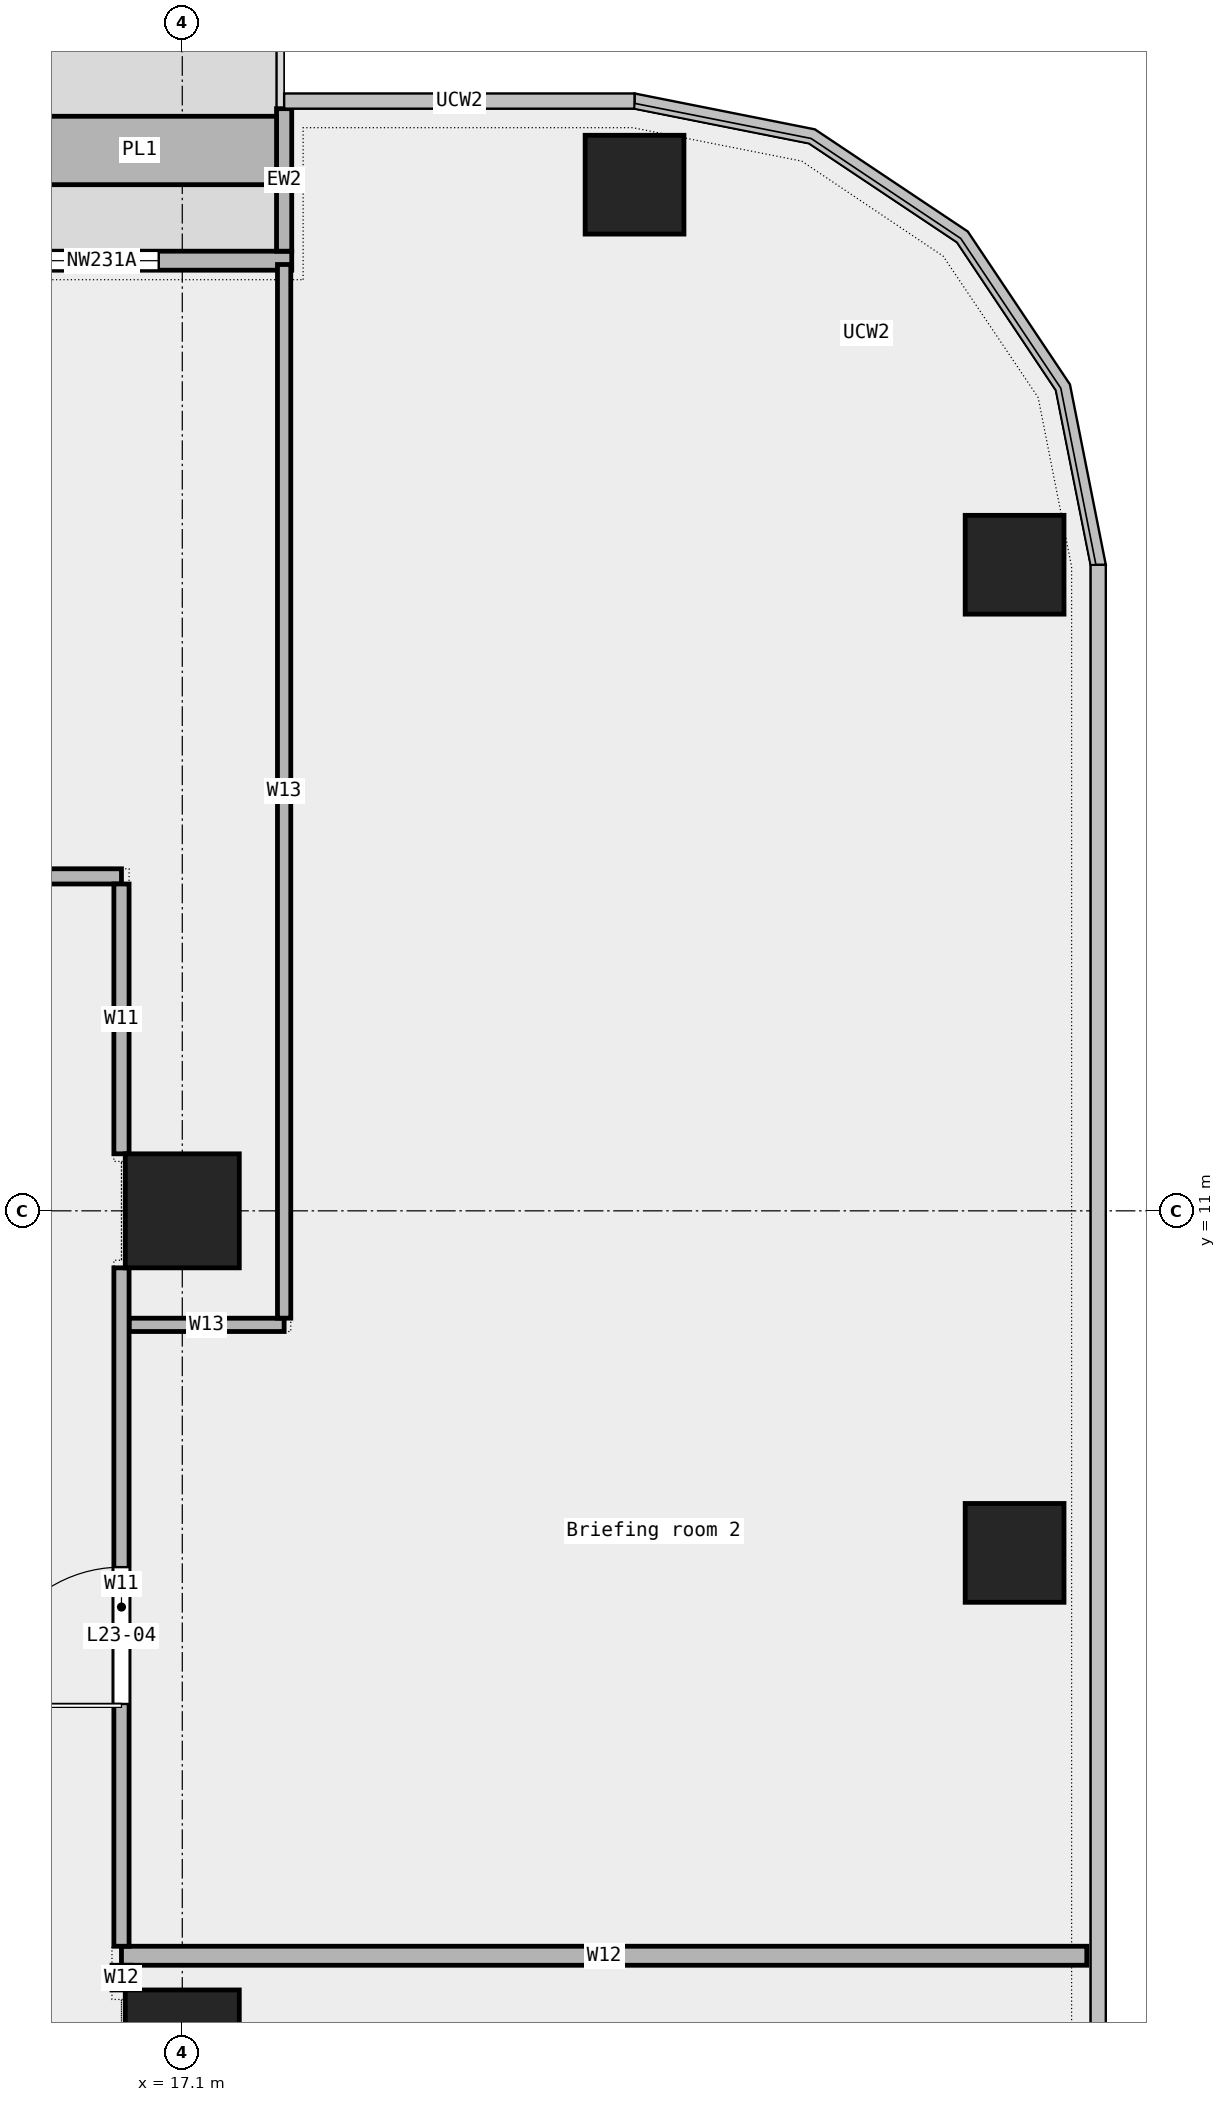
"""IFC4 building model, lengths in metres.
Left out: names, types, materials, properties, quantities, classifications, styles, units other than length and angle.
Written with IfcOpenShell. Run it as: python <this file> out.ifc"""

import sys

from ifc_helpers import new_model, si_unit, direction, frame, frame_2d, origin, origin_2d, place, context, subcontext, project, spatial, rectangle, extrude, element, fill, save


model = new_model("IFC4")
c1 = context("Model", 3, precision=1e-05, world=origin(), true_north=direction((0.0, 1.0)))
c2 = subcontext(c1, "Body", "Model", "MODEL_VIEW")
j1 = project(units=[si_unit("LENGTHUNIT", "METRE"), si_unit("PLANEANGLEUNIT", "RADIAN")], contexts=[c1])
p1 = place(None, origin())
s1 = spatial("IfcSite", under=j1, at=p1, CompositionType="ELEMENT")
p2 = place(p1, origin())
s2 = spatial("IfcBuilding", under=s1, at=p2, CompositionType="ELEMENT")
p3 = place(p2, frame((0.0, 0.0, 117.1)))
s3 = spatial("IfcBuildingStorey", under=s2, at=p3, CompositionType="ELEMENT", Elevation=117.1)
for number, where, z_axis, x_axis in (
    (1, (28.05, 6.5, 0.0), (0.0, 0.0, 1.0), (1.0, 0.0, 0.0)),
    (2, (28.05, 19.5, 0.0), (0.0, 0.0, 1.0), (1.0, 0.0, 0.0)),
    (3, (23.05, 24.5, 0.0), (0.0, 0.0, 1.0), (1.0, 0.0, 0.0)),
):
    element("IfcColumn", number, at=place(p3, frame(where, z_axis=z_axis, x_axis=x_axis)), inside=s3, PredefinedType="COLUMN", context=c2, shape_type="SweptSolid", body=[
        extrude(rectangle(XDim=1.3, YDim=1.3, at=origin_2d()), origin(), (0.0, 0.0, 1.0), 4.05),
    ])
for number, where, z_axis, x_axis in (
    (4, (17.1, 0.0, 0.0), (0.0, 0.0, 1.0), (1.0, 0.0, 0.0)),
    (5, (17.1, 11.0, 0.0), (0.0, 0.0, 1.0), (1.0, 0.0, 0.0)),
):
    element("IfcColumn", number, at=place(p3, frame(where, z_axis=z_axis, x_axis=x_axis)), inside=s3, PredefinedType="COLUMN", context=c2, shape_type="SweptSolid", body=[
        extrude(rectangle(XDim=1.5, YDim=1.5, at=origin_2d()), origin(), (0.0, 0.0, 1.0), 4.05),
    ])
p4 = place(p3, frame((18.54, 23.5, 0.0), z_axis=(0.0, 0.0, 1.0), x_axis=(-1.0, 0.0, 0.0)))
e6 = element("IfcWall", 6, at=p4, inside=s3, PredefinedType="STANDARD", context=c2, shape_type="SweptSolid", body=[
    extrude(rectangle(XDim=14.03, YDim=0.25, at=frame_2d((7.015, 0.0))), origin(), (0.0, 0.0, 1.0), 4.05),
])
p5 = place(p4, frame((1.75, 0.0, 0.45)))
e7 = element("IfcOpeningElement", 7, at=p5, cuts=e6, PredefinedType="OPENING", context=c2, shape_type="SweptSolid", body=[
    extrude(rectangle(XDim=1.5, YDim=3.0, at=frame_2d((0.75, 1.5))), frame((0.0, 0.137, 0.0), z_axis=(0.0, -1.0, 0.0), x_axis=(1.0, 0.0, 0.0)), (0.0, 0.0, 1.0), 0.274),
])
p6 = place(p4, frame((4.25, 0.0, 0.0)))
e8 = element("IfcOpeningElement", 8, at=p6, cuts=e6, PredefinedType="OPENING", context=c2, shape_type="SweptSolid", body=[
    extrude(rectangle(XDim=1.8, YDim=2.4, at=frame_2d((0.9, 1.2))), frame((0.0, 0.137, 0.0), z_axis=(0.0, -1.0, 0.0), x_axis=(1.0, 0.0, 0.0)), (0.0, 0.0, 1.0), 0.274),
])
p7 = place(p4, frame((10.75, 0.0, 0.45)))
e9 = element("IfcOpeningElement", 9, at=p7, cuts=e6, PredefinedType="OPENING", context=c2, shape_type="SweptSolid", body=[
    extrude(rectangle(XDim=1.5, YDim=3.0, at=frame_2d((0.75, 1.5))), frame((0.0, 0.137, 0.0), z_axis=(0.0, -1.0, 0.0), x_axis=(1.0, 0.0, 0.0)), (0.0, 0.0, 1.0), 0.274),
])
p8 = place(p3, frame((18.44, 25.5, 0.0), z_axis=(0.0, 0.0, 1.0), x_axis=(0.0, -1.0, 0.0)))
e10 = element("IfcWall", 10, at=p8, inside=s3, PredefinedType="STANDARD", context=c2, shape_type="SweptSolid", body=[
    extrude(rectangle(XDim=1.875, YDim=0.2, at=frame_2d((0.938, 0.0))), origin(), (0.0, 0.0, 1.0), 4.05),
])
p9 = place(p3, frame((18.34, 24.95, 0.0), z_axis=(0.0, 0.0, 1.0), x_axis=(-1.0, 0.0, 0.0)))
e11 = element("IfcWall", 11, at=p9, inside=s3, PredefinedType="STANDARD", context=c2, shape_type="SweptSolid", body=[
    extrude(rectangle(XDim=3.6, YDim=0.9, at=frame_2d((1.8, 0.0))), origin(), (0.0, 0.0, 1.0), 0.7),
])
p10 = place(p3, frame((16.3, 1.2, 0.0), z_axis=(0.0, 0.0, 1.0), x_axis=(1.0, 0.0, 0.0)))
e12 = element("IfcWall", 12, at=p10, inside=s3, PredefinedType="PARTITIONING", context=c2, shape_type="SweptSolid", body=[
    extrude(rectangle(XDim=12.7, YDim=0.25, at=frame_2d((6.35, 0.0))), origin(), (0.0, 0.0, 1.0), 4.05),
])
p11 = place(p3, frame((16.4, 9.5, 0.0), z_axis=(0.0, 0.0, 1.0), x_axis=(1.0, 0.0, 0.0)))
e13 = element("IfcWall", 13, at=p11, inside=s3, PredefinedType="PARTITIONING", context=c2, shape_type="SweptSolid", body=[
    extrude(rectangle(XDim=2.04, YDim=0.175, at=frame_2d((1.02, 0.0))), origin(), (0.0, 0.0, 1.0), 4.05),
])
p12 = place(p3, frame((4.61, 15.4, 0.0), z_axis=(0.0, 0.0, 1.0), x_axis=(1.0, 0.0, 0.0)))
e14 = element("IfcWall", 14, at=p12, inside=s3, PredefinedType="PARTITIONING", context=c2, shape_type="SweptSolid", body=[
    extrude(rectangle(XDim=11.69, YDim=0.2, at=frame_2d((5.845, 0.0))), origin(), (0.0, 0.0, 1.0), 4.05),
])
p13 = place(p12, frame((5.095, 0.0, 0.0)))
e15 = element("IfcOpeningElement", 15, at=p13, cuts=e14, PredefinedType="OPENING", context=c2, shape_type="SweptSolid", body=[
    extrude(rectangle(XDim=1.5, YDim=2.1, at=frame_2d((0.75, 1.05))), frame((0.0, 0.112, 0.0), z_axis=(0.0, -1.0, 0.0), x_axis=(1.0, 0.0, 0.0)), (0.0, 0.0, 1.0), 0.224),
])
p14 = place(p3, frame((16.3, 1.325, 0.0), z_axis=(0.0, 0.0, 1.0), x_axis=(0.0, 1.0, 0.0)))
e16 = element("IfcWall", 16, at=p14, inside=s3, PredefinedType="PARTITIONING", context=c2, shape_type="SweptSolid", body=[
    extrude(rectangle(XDim=8.925, YDim=0.2, at=frame_2d((4.462, 0.0))), origin(), (0.0, 0.0, 1.0), 4.05),
])
p15 = place(p14, frame((3.188, 0.0, 0.0)))
e17 = element("IfcOpeningElement", 17, at=p15, cuts=e16, PredefinedType="OPENING", context=c2, shape_type="SweptSolid", body=[
    extrude(rectangle(XDim=1.8, YDim=2.1, at=frame_2d((0.9, 1.05))), frame((0.0, 0.112, 0.0), z_axis=(0.0, -1.0, 0.0), x_axis=(1.0, 0.0, 0.0)), (0.0, 0.0, 1.0), 0.224),
])
p16 = place(p3, frame((16.3, 11.75, 0.0), z_axis=(0.0, 0.0, 1.0), x_axis=(0.0, 1.0, 0.0)))
e18 = element("IfcWall", 18, at=p16, inside=s3, PredefinedType="PARTITIONING", context=c2, shape_type="SweptSolid", body=[
    extrude(rectangle(XDim=3.55, YDim=0.2, at=frame_2d((1.775, 0.0))), origin(), (0.0, 0.0, 1.0), 4.05),
])
p17 = place(p3, frame((16.3, 0.75, 0.0), z_axis=(0.0, 0.0, 1.0), x_axis=(0.0, 1.0, 0.0)))
e19 = element("IfcWall", 19, at=p17, inside=s3, PredefinedType="PARTITIONING", context=c2, shape_type="SweptSolid", body=[
    extrude(rectangle(XDim=0.325, YDim=0.25, at=frame_2d((0.163, 0.0))), origin(), (0.0, 0.0, 1.0), 4.05),
])
p18 = place(p3, frame((18.44, 9.588, 0.0), z_axis=(0.0, 0.0, 1.0), x_axis=(0.0, 1.0, 0.0)))
e20 = element("IfcWall", 20, at=p18, inside=s3, PredefinedType="PARTITIONING", context=c2, shape_type="SweptSolid", body=[
    extrude(rectangle(XDim=13.862, YDim=0.175, at=frame_2d((6.931, 0.0))), origin(), (0.0, 0.0, 1.0), 4.05),
])
p19 = place(p5, origin())
e21 = element("IfcWindow", 21, at=p19, inside=s3, PartitioningType="SINGLE_PANEL", PredefinedType="WINDOW", context=c2, shape_type="SweptSolid", body=[
    extrude(rectangle(XDim=1.5, YDim=3.0, at=frame_2d((0.75, 1.5))), frame((0.0, 0.03, 0.0), z_axis=(0.0, -1.0, 0.0), x_axis=(1.0, 0.0, 0.0)), (0.0, 0.0, 1.0), 0.06),
])
fill(e7, e21)
p20 = place(p15, origin())
e22 = element("IfcDoor", 22, at=p20, inside=s3, OperationType="DOUBLE_DOOR_SINGLE_SWING", PredefinedType="DOOR", context=c2, shape_type="SweptSolid", body=[
    extrude(rectangle(XDim=1.8, YDim=2.1, at=frame_2d((0.9, 1.05))), frame((0.0, 0.025, 0.0), z_axis=(0.0, -1.0, 0.0), x_axis=(1.0, 0.0, 0.0)), (0.0, 0.0, 1.0), 0.05),
])
fill(e17, e22)
save(model, sys.argv[1])
